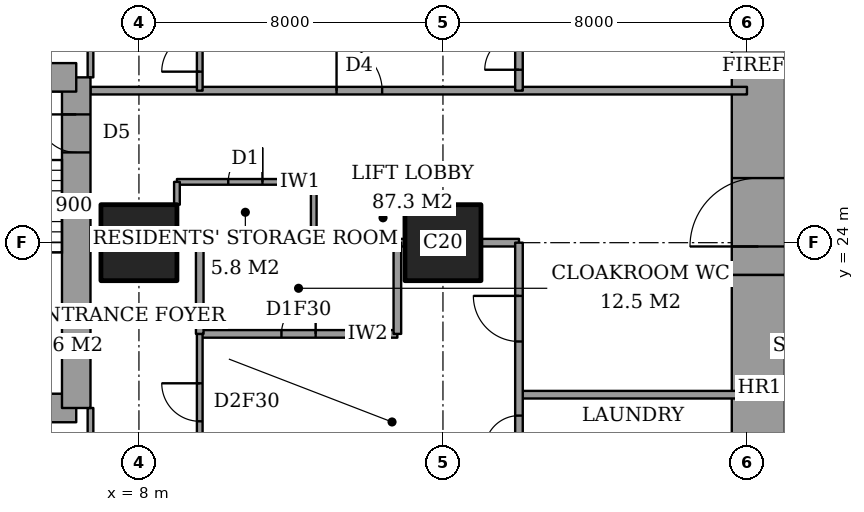
"""IFC4 building model, lengths in metres.
Left out: names, types, materials, properties, quantities, classifications, styles, units other than length and angle.
Written with IfcOpenShell. Run it as: python <this file> out.ifc"""

import sys

from ifc_helpers import new_model, si_unit, direction, frame, frame_2d, origin, origin_2d, place, context, subcontext, project, spatial, rectangle, extrude, element, fill, save


model = new_model("IFC4")
c1 = context("Model", 3, precision=1e-05, world=origin(), true_north=direction((0.0, 1.0)))
c2 = subcontext(c1, "Body", "Model", "MODEL_VIEW")
j1 = project(units=[si_unit("LENGTHUNIT", "METRE"), si_unit("PLANEANGLEUNIT", "RADIAN")], contexts=[c1])
p1 = place(None, origin())
s1 = spatial("IfcSite", under=j1, at=p1, CompositionType="ELEMENT")
p2 = place(p1, origin())
s2 = spatial("IfcBuilding", under=s1, at=p2, CompositionType="ELEMENT")
p3 = place(p2, frame((0.0, 0.0, 65.6)))
s3 = spatial("IfcBuildingStorey", under=s2, at=p3, CompositionType="ELEMENT", Elevation=65.6)
for number, where, z_axis, x_axis in (
    (1, (8.0, 24.0, 0.0), (0.0, 0.0, 1.0), (1.0, 0.0, 0.0)),
    (2, (16.0, 24.0, 0.0), (0.0, 0.0, 1.0), (1.0, 0.0, 0.0)),
):
    element("IfcColumn", number, at=place(p3, frame(where, z_axis=z_axis, x_axis=x_axis)), inside=s3, PredefinedType="COLUMN", context=c2, shape_type="SweptSolid", body=[
        extrude(rectangle(XDim=2.0, YDim=2.0, at=origin_2d()), origin(), (0.0, 0.0, 1.0), 3.6),
    ])
p4 = place(p3, frame((24.3, 13.0, 0.0), z_axis=(0.0, 0.0, 1.0), x_axis=(0.0, 1.0, 0.0)))
e3 = element("IfcWall", 3, at=p4, inside=s3, PredefinedType="SHEAR", context=c2, shape_type="SweptSolid", body=[
    extrude(rectangle(XDim=10.15, YDim=1.4, at=frame_2d((5.075, 0.0))), origin(), (0.0, 0.0, 1.0), 3.6),
])
p5 = place(p3, frame((24.3, 23.15, 0.0), z_axis=(0.0, 0.0, 1.0), x_axis=(0.0, 1.0, 0.0)))
e4 = element("IfcWall", 4, at=p5, inside=s3, PredefinedType="SHEAR", context=c2, shape_type="SweptSolid", body=[
    extrude(rectangle(XDim=11.85, YDim=1.4, at=frame_2d((5.925, 0.0))), origin(), (0.0, 0.0, 1.0), 3.6),
])
p6 = place(p5, frame((0.75, 0.0, 0.0)))
e5 = element("IfcOpeningElement", 5, at=p6, cuts=e4, PredefinedType="OPENING", context=c2, shape_type="SweptSolid", body=[
    extrude(rectangle(XDim=1.8, YDim=2.4, at=frame_2d((0.9, 1.2))), frame((0.0, 0.71, 0.0), z_axis=(0.0, -1.0, 0.0), x_axis=(1.0, 0.0, 0.0)), (0.0, 0.0, 1.0), 1.42),
])
p7 = place(p3, frame((1.9, 19.65, 0.0), z_axis=(0.0, 0.0, 1.0), x_axis=(1.0, 0.0, 0.0)))
e6 = element("IfcWall", 6, at=p7, inside=s3, PredefinedType="SHEAR", context=c2, shape_type="SweptSolid", body=[
    extrude(rectangle(XDim=4.45, YDim=0.75, at=frame_2d((2.225, 0.0))), origin(), (0.0, 0.0, 1.0), 3.6),
])
p8 = place(p3, frame((6.35, 19.65, 0.0), z_axis=(0.0, 0.0, 1.0), x_axis=(0.0, 1.0, 0.0)))
e7 = element("IfcWall", 7, at=p8, inside=s3, PredefinedType="SHEAR", context=c2, shape_type="SweptSolid", body=[
    extrude(rectangle(XDim=8.7, YDim=0.75, at=frame_2d((4.35, 0.0))), origin(), (0.0, 0.0, 1.0), 3.6),
])
p9 = place(p8, frame((6.725, 0.0, 0.0)))
e8 = element("IfcOpeningElement", 8, at=p9, cuts=e7, PredefinedType="OPENING", context=c2, shape_type="SweptSolid", body=[
    extrude(rectangle(XDim=1.0, YDim=2.1, at=frame_2d((0.5, 1.05))), frame((0.0, 0.385, 0.0), z_axis=(0.0, -1.0, 0.0), x_axis=(1.0, 0.0, 0.0)), (0.0, 0.0, 1.0), 0.77),
])
p10 = place(p3, frame((6.35, 28.35, 0.0), z_axis=(0.0, 0.0, 1.0), x_axis=(-1.0, 0.0, 0.0)))
e9 = element("IfcWall", 9, at=p10, inside=s3, PredefinedType="SHEAR", context=c2, shape_type="SweptSolid", body=[
    extrude(rectangle(XDim=4.45, YDim=0.75, at=frame_2d((2.225, 0.0))), origin(), (0.0, 0.0, 1.0), 3.6),
])
p11 = place(p3, frame((18.0, 20.0, 0.0), z_axis=(0.0, 0.0, 1.0), x_axis=(1.0, 0.0, 0.0)))
e10 = element("IfcWall", 10, at=p11, inside=s3, PredefinedType="PARTITIONING", context=c2, shape_type="SweptSolid", body=[
    extrude(rectangle(XDim=6.0, YDim=0.2, at=frame_2d((3.0, 0.0))), origin(), (0.0, 0.0, 1.0), 3.35),
])
p12 = place(p3, frame((9.6, 21.6, 0.0), z_axis=(0.0, 0.0, 1.0), x_axis=(1.0, 0.0, 0.0)))
e11 = element("IfcWall", 11, at=p12, inside=s3, PredefinedType="PARTITIONING", context=c2, shape_type="SweptSolid", body=[
    extrude(rectangle(XDim=5.2, YDim=0.2, at=frame_2d((2.6, 0.0))), origin(), (0.0, 0.0, 1.0), 3.35),
])
p13 = place(p12, frame((2.15, 0.0, 0.0)))
e12 = element("IfcOpeningElement", 12, at=p13, cuts=e11, PredefinedType="OPENING", context=c2, shape_type="SweptSolid", body=[
    extrude(rectangle(XDim=0.9, YDim=2.1, at=frame_2d((0.45, 1.05))), frame((0.0, 0.11, 0.0), z_axis=(0.0, -1.0, 0.0), x_axis=(1.0, 0.0, 0.0)), (0.0, 0.0, 1.0), 0.22),
])
p14 = place(p3, frame((9.0, 24.0, 0.0), z_axis=(0.0, 0.0, 1.0), x_axis=(1.0, 0.0, 0.0)))
e13 = element("IfcWall", 13, at=p14, inside=s3, PredefinedType="PARTITIONING", context=c2, shape_type="SweptSolid", body=[
    extrude(rectangle(XDim=6.0, YDim=0.2, at=frame_2d((3.0, 0.0))), origin(), (0.0, 0.0, 1.0), 3.35),
])
p15 = place(p3, frame((17.0, 24.0, 0.0), z_axis=(0.0, 0.0, 1.0), x_axis=(1.0, 0.0, 0.0)))
e14 = element("IfcWall", 14, at=p15, inside=s3, PredefinedType="PARTITIONING", context=c2, shape_type="SweptSolid", body=[
    extrude(rectangle(XDim=1.0, YDim=0.2, at=frame_2d((0.5, 0.0))), origin(), (0.0, 0.0, 1.0), 3.35),
])
p16 = place(p3, frame((9.0, 25.6, 0.0), z_axis=(0.0, 0.0, 1.0), x_axis=(1.0, 0.0, 0.0)))
e15 = element("IfcWall", 15, at=p16, inside=s3, PredefinedType="PARTITIONING", context=c2, shape_type="SweptSolid", body=[
    extrude(rectangle(XDim=3.6, YDim=0.15, at=frame_2d((1.8, 0.0))), origin(), (0.0, 0.0, 1.0), 3.35),
])
p17 = place(p16, frame((1.35, 0.0, 0.0)))
e16 = element("IfcOpeningElement", 16, at=p17, cuts=e15, PredefinedType="OPENING", context=c2, shape_type="SweptSolid", body=[
    extrude(rectangle(XDim=0.9, YDim=2.1, at=frame_2d((0.45, 1.05))), frame((0.0, 0.085, 0.0), z_axis=(0.0, -1.0, 0.0), x_axis=(1.0, 0.0, 0.0)), (0.0, 0.0, 1.0), 0.17),
])
p18 = place(p3, frame((6.725, 28.0, 0.0), z_axis=(0.0, 0.0, 1.0), x_axis=(1.0, 0.0, 0.0)))
e17 = element("IfcWall", 17, at=p18, inside=s3, PredefinedType="PARTITIONING", context=c2, shape_type="SweptSolid", body=[
    extrude(rectangle(XDim=17.275, YDim=0.2, at=frame_2d((8.637, 0.0))), origin(), (0.0, 0.0, 1.0), 3.35),
])
p19 = place(p18, frame((6.475, 0.0, 0.0)))
e18 = element("IfcOpeningElement", 18, at=p19, cuts=e17, PredefinedType="OPENING", context=c2, shape_type="SweptSolid", body=[
    extrude(rectangle(XDim=1.2, YDim=2.4, at=frame_2d((0.6, 1.2))), frame((0.0, 0.11, 0.0), z_axis=(0.0, -1.0, 0.0), x_axis=(1.0, 0.0, 0.0)), (0.0, 0.0, 1.0), 0.22),
])
p20 = place(p3, frame((6.725, 17.2, 0.0), z_axis=(0.0, 0.0, 1.0), x_axis=(0.0, 1.0, 0.0)))
e19 = element("IfcWall", 19, at=p20, inside=s3, PredefinedType="PARTITIONING", context=c2, shape_type="SweptSolid", body=[
    extrude(rectangle(XDim=2.45, YDim=0.15, at=frame_2d((1.225, 0.0))), origin(), (0.0, 0.0, 1.0), 3.35),
])
p21 = place(p20, frame((0.538, 0.0, 0.0)))
e20 = element("IfcOpeningElement", 20, at=p21, cuts=e19, PredefinedType="OPENING", context=c2, shape_type="SweptSolid", body=[
    extrude(rectangle(XDim=1.0, YDim=2.1, at=frame_2d((0.5, 1.05))), frame((0.0, 0.085, 0.0), z_axis=(0.0, -1.0, 0.0), x_axis=(1.0, 0.0, 0.0)), (0.0, 0.0, 1.0), 0.17),
])
p22 = place(p3, frame((6.725, 28.35, 0.0), z_axis=(0.0, 0.0, 1.0), x_axis=(0.0, 1.0, 0.0)))
e21 = element("IfcWall", 21, at=p22, inside=s3, PredefinedType="PARTITIONING", context=c2, shape_type="SweptSolid", body=[
    extrude(rectangle(XDim=2.45, YDim=0.15, at=frame_2d((1.225, 0.0))), origin(), (0.0, 0.0, 1.0), 3.35),
])
p23 = place(p22, frame((0.913, 0.0, 0.0)))
e22 = element("IfcOpeningElement", 22, at=p23, cuts=e21, PredefinedType="OPENING", context=c2, shape_type="SweptSolid", body=[
    extrude(rectangle(XDim=1.0, YDim=2.1, at=frame_2d((0.5, 1.05))), frame((0.0, 0.085, 0.0), z_axis=(0.0, -1.0, 0.0), x_axis=(1.0, 0.0, 0.0)), (0.0, 0.0, 1.0), 0.17),
])
p24 = place(p3, frame((9.0, 25.0, 0.0), z_axis=(0.0, 0.0, 1.0), x_axis=(0.0, 1.0, 0.0)))
e23 = element("IfcWall", 23, at=p24, inside=s3, PredefinedType="PARTITIONING", context=c2, shape_type="SweptSolid", body=[
    extrude(rectangle(XDim=0.6, YDim=0.15, at=frame_2d((0.3, 0.0))), origin(), (0.0, 0.0, 1.0), 3.35),
])
p25 = place(p3, frame((9.6, 21.6, 0.0), z_axis=(0.0, 0.0, 1.0), x_axis=(0.0, 1.0, 0.0)))
e24 = element("IfcWall", 24, at=p25, inside=s3, PredefinedType="PARTITIONING", context=c2, shape_type="SweptSolid", body=[
    extrude(rectangle(XDim=2.4, YDim=0.2, at=frame_2d((1.2, 0.0))), origin(), (0.0, 0.0, 1.0), 3.35),
])
p26 = place(p3, frame((9.6, 10.6, 0.0), z_axis=(0.0, 0.0, 1.0), x_axis=(0.0, 1.0, 0.0)))
e25 = element("IfcWall", 25, at=p26, inside=s3, PredefinedType="PARTITIONING", context=c2, shape_type="SweptSolid", body=[
    extrude(rectangle(XDim=11.0, YDim=0.15, at=frame_2d((5.5, 0.0))), origin(), (0.0, 0.0, 1.0), 3.35),
])
p27 = place(p26, frame((8.7, 0.0, 0.0)))
e26 = element("IfcOpeningElement", 26, at=p27, cuts=e25, PredefinedType="OPENING", context=c2, shape_type="SweptSolid", body=[
    extrude(rectangle(XDim=1.0, YDim=2.1, at=frame_2d((0.5, 1.05))), frame((0.0, 0.085, 0.0), z_axis=(0.0, -1.0, 0.0), x_axis=(1.0, 0.0, 0.0)), (0.0, 0.0, 1.0), 0.17),
])
p28 = place(p3, frame((9.6, 28.0, 0.0), z_axis=(0.0, 0.0, 1.0), x_axis=(0.0, 1.0, 0.0)))
e27 = element("IfcWall", 27, at=p28, inside=s3, PredefinedType="PARTITIONING", context=c2, shape_type="SweptSolid", body=[
    extrude(rectangle(XDim=9.4, YDim=0.15, at=frame_2d((4.7, 0.0))), origin(), (0.0, 0.0, 1.0), 3.35),
])
p29 = place(p28, frame((0.5, 0.0, 0.0)))
e28 = element("IfcOpeningElement", 28, at=p29, cuts=e27, PredefinedType="OPENING", context=c2, shape_type="SweptSolid", body=[
    extrude(rectangle(XDim=1.0, YDim=2.1, at=frame_2d((0.5, 1.05))), frame((0.0, 0.085, 0.0), z_axis=(0.0, -1.0, 0.0), x_axis=(1.0, 0.0, 0.0)), (0.0, 0.0, 1.0), 0.17),
])
p30 = place(p3, frame((12.6, 24.0, 0.0), z_axis=(0.0, 0.0, 1.0), x_axis=(0.0, 1.0, 0.0)))
e29 = element("IfcWall", 29, at=p30, inside=s3, PredefinedType="PARTITIONING", context=c2, shape_type="SweptSolid", body=[
    extrude(rectangle(XDim=1.6, YDim=0.15, at=frame_2d((0.8, 0.0))), origin(), (0.0, 0.0, 1.0), 3.35),
])
p31 = place(p3, frame((14.8, 21.6, 0.0), z_axis=(0.0, 0.0, 1.0), x_axis=(0.0, 1.0, 0.0)))
e30 = element("IfcWall", 30, at=p31, inside=s3, PredefinedType="PARTITIONING", context=c2, shape_type="SweptSolid", body=[
    extrude(rectangle(XDim=2.4, YDim=0.2, at=frame_2d((1.2, 0.0))), origin(), (0.0, 0.0, 1.0), 3.35),
])
p32 = place(p3, frame((18.0, 18.0, 0.0), z_axis=(0.0, 0.0, 1.0), x_axis=(0.0, 1.0, 0.0)))
e31 = element("IfcWall", 31, at=p32, inside=s3, PredefinedType="PARTITIONING", context=c2, shape_type="SweptSolid", body=[
    extrude(rectangle(XDim=6.0, YDim=0.2, at=frame_2d((3.0, 0.0))), origin(), (0.0, 0.0, 1.0), 3.35),
])
p33 = place(p32, frame((3.4, 0.0, 0.0)))
e32 = element("IfcOpeningElement", 32, at=p33, cuts=e31, PredefinedType="OPENING", context=c2, shape_type="SweptSolid", body=[
    extrude(rectangle(XDim=1.2, YDim=2.4, at=frame_2d((0.6, 1.2))), frame((0.0, 0.11, 0.0), z_axis=(0.0, -1.0, 0.0), x_axis=(1.0, 0.0, 0.0)), (0.0, 0.0, 1.0), 0.22),
])
p34 = place(p32, frame((0.55, 0.0, 0.0)))
e33 = element("IfcOpeningElement", 33, at=p34, cuts=e31, PredefinedType="OPENING", context=c2, shape_type="SweptSolid", body=[
    extrude(rectangle(XDim=0.9, YDim=2.1, at=frame_2d((0.45, 1.05))), frame((0.0, 0.11, 0.0), z_axis=(0.0, -1.0, 0.0), x_axis=(1.0, 0.0, 0.0)), (0.0, 0.0, 1.0), 0.22),
])
p35 = place(p3, frame((18.0, 28.0, 0.0), z_axis=(0.0, 0.0, 1.0), x_axis=(0.0, 1.0, 0.0)))
e34 = element("IfcWall", 34, at=p35, inside=s3, PredefinedType="PARTITIONING", context=c2, shape_type="SweptSolid", body=[
    extrude(rectangle(XDim=3.4, YDim=0.2, at=frame_2d((1.7, 0.0))), origin(), (0.0, 0.0, 1.0), 3.35),
])
p36 = place(p35, frame((0.55, 0.0, 0.0)))
e35 = element("IfcOpeningElement", 35, at=p36, cuts=e34, PredefinedType="OPENING", context=c2, shape_type="SweptSolid", body=[
    extrude(rectangle(XDim=0.9, YDim=2.1, at=frame_2d((0.45, 1.05))), frame((0.0, 0.11, 0.0), z_axis=(0.0, -1.0, 0.0), x_axis=(1.0, 0.0, 0.0)), (0.0, 0.0, 1.0), 0.22),
])
p37 = place(p27, origin())
e36 = element("IfcDoor", 36, at=p37, inside=s3, OperationType="SINGLE_SWING_LEFT", PredefinedType="DOOR", context=c2, shape_type="SweptSolid", body=[
    extrude(rectangle(XDim=1.0, YDim=2.1, at=frame_2d((0.5, 1.05))), frame((0.0, 0.025, 0.0), z_axis=(0.0, -1.0, 0.0), x_axis=(1.0, 0.0, 0.0)), (0.0, 0.0, 1.0), 0.05),
])
fill(e26, e36)
p38 = place(p13, origin())
e37 = element("IfcDoor", 37, at=p38, inside=s3, OperationType="SINGLE_SWING_LEFT", PredefinedType="DOOR", context=c2, shape_type="SweptSolid", body=[
    extrude(rectangle(XDim=0.9, YDim=2.1, at=frame_2d((0.45, 1.05))), frame((0.0, 0.025, 0.0), z_axis=(0.0, -1.0, 0.0), x_axis=(1.0, 0.0, 0.0)), (0.0, 0.0, 1.0), 0.05),
])
fill(e12, e37)
p39 = place(p33, origin())
e38 = element("IfcDoor", 38, at=p39, inside=s3, OperationType="SINGLE_SWING_LEFT", PredefinedType="DOOR", context=c2, shape_type="SweptSolid", body=[
    extrude(rectangle(XDim=1.2, YDim=2.4, at=frame_2d((0.6, 1.2))), frame((0.0, 0.025, 0.0), z_axis=(0.0, -1.0, 0.0), x_axis=(1.0, 0.0, 0.0)), (0.0, 0.0, 1.0), 0.05),
])
fill(e32, e38)
p40 = place(p34, origin())
e39 = element("IfcDoor", 39, at=p40, inside=s3, OperationType="SINGLE_SWING_RIGHT", PredefinedType="DOOR", context=c2, shape_type="SweptSolid", body=[
    extrude(rectangle(XDim=0.9, YDim=2.1, at=frame_2d((0.45, 1.05))), frame((0.0, 0.025, 0.0), z_axis=(0.0, -1.0, 0.0), x_axis=(1.0, 0.0, 0.0)), (0.0, 0.0, 1.0), 0.05),
])
fill(e33, e39)
p41 = place(p29, origin())
e40 = element("IfcDoor", 40, at=p41, inside=s3, OperationType="SINGLE_SWING_RIGHT", PredefinedType="DOOR", context=c2, shape_type="SweptSolid", body=[
    extrude(rectangle(XDim=1.0, YDim=2.1, at=frame_2d((0.5, 1.05))), frame((0.0, 0.025, 0.0), z_axis=(0.0, -1.0, 0.0), x_axis=(1.0, 0.0, 0.0)), (0.0, 0.0, 1.0), 0.05),
])
fill(e28, e40)
p42 = place(p19, origin())
e41 = element("IfcDoor", 41, at=p42, inside=s3, OperationType="SINGLE_SWING_RIGHT", PredefinedType="DOOR", context=c2, shape_type="SweptSolid", body=[
    extrude(rectangle(XDim=1.2, YDim=2.4, at=frame_2d((0.6, 1.2))), frame((0.0, 0.025, 0.0), z_axis=(0.0, -1.0, 0.0), x_axis=(1.0, 0.0, 0.0)), (0.0, 0.0, 1.0), 0.05),
])
fill(e18, e41)
p43 = place(p36, origin())
e42 = element("IfcDoor", 42, at=p43, inside=s3, OperationType="SINGLE_SWING_RIGHT", PredefinedType="DOOR", context=c2, shape_type="SweptSolid", body=[
    extrude(rectangle(XDim=0.9, YDim=2.1, at=frame_2d((0.45, 1.05))), frame((0.0, 0.025, 0.0), z_axis=(0.0, -1.0, 0.0), x_axis=(1.0, 0.0, 0.0)), (0.0, 0.0, 1.0), 0.05),
])
fill(e35, e42)
p44 = place(p17, origin())
e43 = element("IfcDoor", 43, at=p44, inside=s3, OperationType="SINGLE_SWING_LEFT", PredefinedType="DOOR", context=c2, shape_type="SweptSolid", body=[
    extrude(rectangle(XDim=0.9, YDim=2.1, at=frame_2d((0.45, 1.05))), frame((0.0, 0.025, 0.0), z_axis=(0.0, -1.0, 0.0), x_axis=(1.0, 0.0, 0.0)), (0.0, 0.0, 1.0), 0.05),
])
fill(e16, e43)
p45 = place(p6, origin())
e44 = element("IfcDoor", 44, at=p45, inside=s3, OperationType="DOUBLE_DOOR_DOUBLE_SWING", PredefinedType="DOOR", context=c2, shape_type="SweptSolid", body=[
    extrude(rectangle(XDim=1.8, YDim=2.4, at=frame_2d((0.9, 1.2))), frame((0.0, 0.025, 0.0), z_axis=(0.0, -1.0, 0.0), x_axis=(1.0, 0.0, 0.0)), (0.0, 0.0, 1.0), 0.05),
])
fill(e5, e44)
p46 = place(p9, origin())
e45 = element("IfcDoor", 45, at=p46, inside=s3, OperationType="SINGLE_SWING_LEFT", PredefinedType="DOOR", context=c2, shape_type="SweptSolid", body=[
    extrude(rectangle(XDim=1.0, YDim=2.1, at=frame_2d((0.5, 1.05))), frame((0.0, 0.025, 0.0), z_axis=(0.0, -1.0, 0.0), x_axis=(1.0, 0.0, 0.0)), (0.0, 0.0, 1.0), 0.05),
])
fill(e8, e45)
save(model, sys.argv[1])
